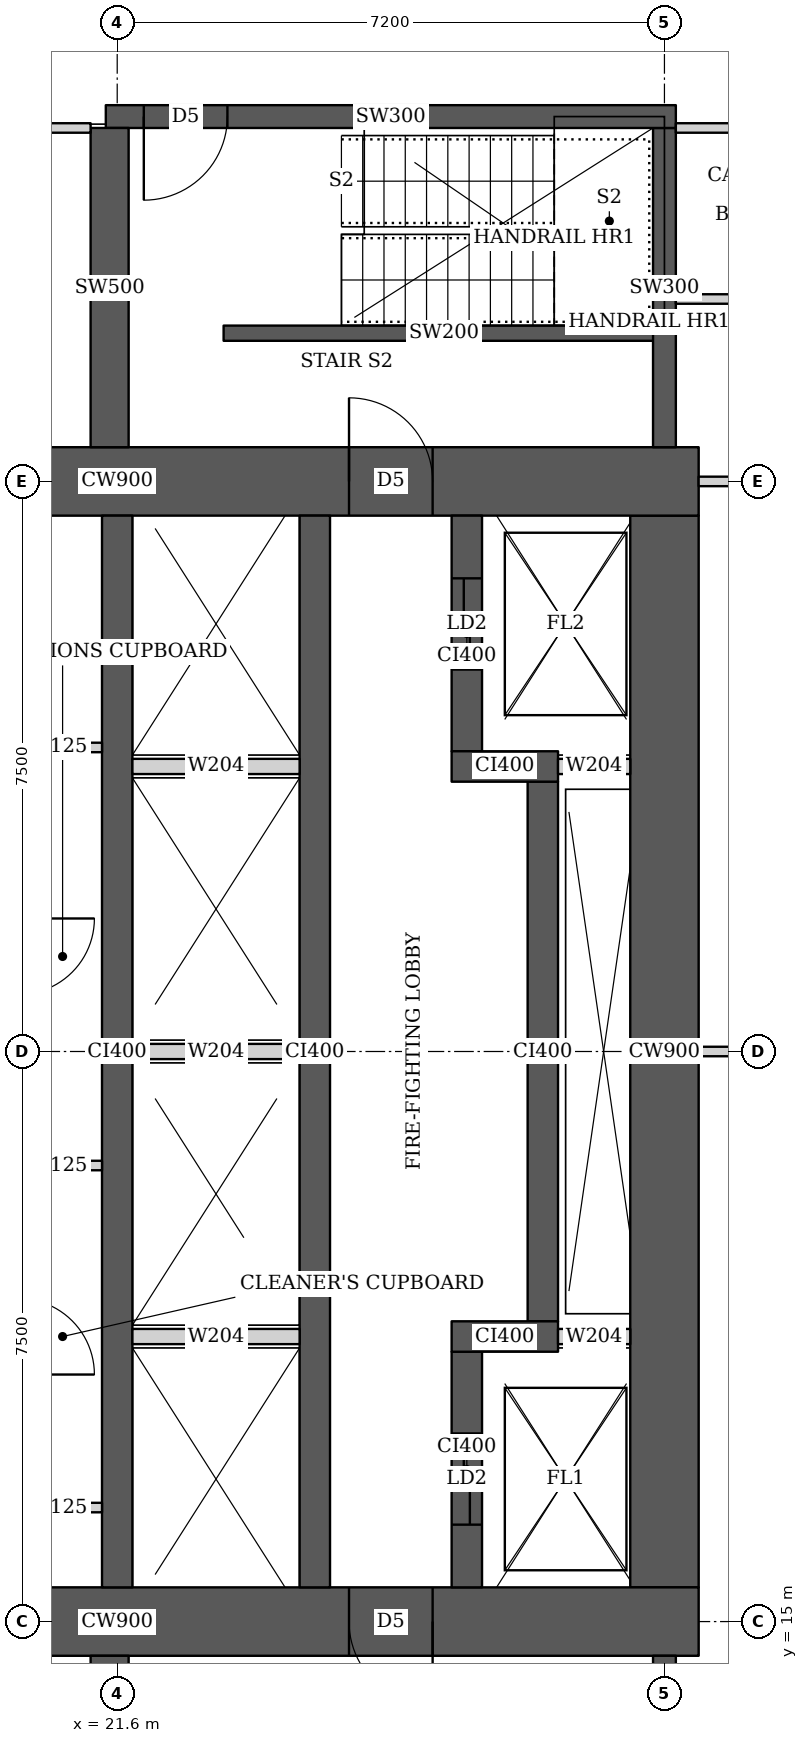
"""IFC4 building model, lengths in metres.
Left out: names, types, materials, properties, quantities, classifications, styles, units other than length and angle.
Written with IfcOpenShell. Run it as: python <this file> out.ifc"""

import sys

from ifc_helpers import new_model, si_unit, direction, frame, frame_2d, origin, place, context, subcontext, project, spatial, rectangle, extrude, element, fill, save


model = new_model("IFC4")
c1 = context("Model", 3, precision=1e-05, world=origin(), true_north=direction((0.0, 1.0)))
c2 = subcontext(c1, "Body", "Model", "MODEL_VIEW")
j1 = project(units=[si_unit("LENGTHUNIT", "METRE"), si_unit("PLANEANGLEUNIT", "RADIAN")], contexts=[c1])
p1 = place(None, origin())
s1 = spatial("IfcSite", under=j1, at=p1, CompositionType="ELEMENT")
p2 = place(p1, origin())
s2 = spatial("IfcBuilding", under=s1, at=p2, CompositionType="ELEMENT")
p3 = place(p2, frame((0.0, 0.0, 68.75)))
s3 = spatial("IfcBuildingStorey", under=s2, at=p3, CompositionType="ELEMENT", Elevation=68.75)
p4 = place(p3, frame((13.95, 15.0, 0.0), z_axis=(0.0, 0.0, 1.0), x_axis=(1.0, 0.0, 0.0)))
e1 = element("IfcWall", 1, at=p4, inside=s3, PredefinedType="SHEAR", context=c2, shape_type="SweptSolid", body=[
    extrude(rectangle(XDim=15.3, YDim=0.9, at=frame_2d((7.65, 0.0))), origin(), (0.0, 0.0, 1.0), 3.75),
])
p5 = place(p4, frame((4.45, 0.0, 0.0)))
e2 = element("IfcOpeningElement", 2, at=p5, cuts=e1, PredefinedType="OPENING", context=c2, shape_type="SweptSolid", body=[
    extrude(rectangle(XDim=1.8, YDim=2.1, at=frame_2d((0.9, 1.05))), frame((0.0, 0.46, 0.0), z_axis=(0.0, -1.0, 0.0), x_axis=(1.0, 0.0, 0.0)), (0.0, 0.0, 1.0), 0.92),
])
p6 = place(p4, frame((10.7, 0.0, 0.0)))
e3 = element("IfcOpeningElement", 3, at=p6, cuts=e1, PredefinedType="OPENING", context=c2, shape_type="SweptSolid", body=[
    extrude(rectangle(XDim=1.1, YDim=2.1, at=frame_2d((0.55, 1.05))), frame((0.0, 0.46, 0.0), z_axis=(0.0, -1.0, 0.0), x_axis=(1.0, 0.0, 0.0)), (0.0, 0.0, 1.0), 0.92),
])
p7 = place(p3, frame((13.95, 30.0, 0.0), z_axis=(0.0, 0.0, 1.0), x_axis=(1.0, 0.0, 0.0)))
e4 = element("IfcWall", 4, at=p7, inside=s3, PredefinedType="SHEAR", context=c2, shape_type="SweptSolid", body=[
    extrude(rectangle(XDim=15.3, YDim=0.9, at=frame_2d((7.65, 0.0))), origin(), (0.0, 0.0, 1.0), 3.75),
])
p8 = place(p7, frame((4.45, 0.0, 0.0)))
e5 = element("IfcOpeningElement", 5, at=p8, cuts=e4, PredefinedType="OPENING", context=c2, shape_type="SweptSolid", body=[
    extrude(rectangle(XDim=1.8, YDim=2.1, at=frame_2d((0.9, 1.05))), frame((0.0, 0.46, 0.0), z_axis=(0.0, -1.0, 0.0), x_axis=(1.0, 0.0, 0.0)), (0.0, 0.0, 1.0), 0.92),
])
p9 = place(p7, frame((10.7, 0.0, 0.0)))
e6 = element("IfcOpeningElement", 6, at=p9, cuts=e4, PredefinedType="OPENING", context=c2, shape_type="SweptSolid", body=[
    extrude(rectangle(XDim=1.1, YDim=2.1, at=frame_2d((0.55, 1.05))), frame((0.0, 0.46, 0.0), z_axis=(0.0, -1.0, 0.0), x_axis=(1.0, 0.0, 0.0)), (0.0, 0.0, 1.0), 0.92),
])
p10 = place(p3, frame((28.8, 15.45, 0.0), z_axis=(0.0, 0.0, 1.0), x_axis=(0.0, 1.0, 0.0)))
e7 = element("IfcWall", 7, at=p10, inside=s3, PredefinedType="SHEAR", context=c2, shape_type="SweptSolid", body=[
    extrude(rectangle(XDim=14.1, YDim=0.9, at=frame_2d((7.05, 0.0))), origin(), (0.0, 0.0, 1.0), 3.75),
])
for number, where, z_axis, x_axis in (
    (8, (21.6, 15.45, 0.0), (0.0, 0.0, 1.0), (0.0, 1.0, 0.0)),
    (9, (24.2, 15.45, 0.0), (0.0, 0.0, 1.0), (0.0, 1.0, 0.0)),
):
    element("IfcWall", number, at=place(p3, frame(where, z_axis=z_axis, x_axis=x_axis)), inside=s3, PredefinedType="SHEAR", context=c2, shape_type="SweptSolid", body=[
        extrude(rectangle(XDim=14.1, YDim=0.4, at=frame_2d((7.05, 0.0))), origin(), (0.0, 0.0, 1.0), 3.75),
    ])
p11 = place(p3, frame((26.2, 15.45, 0.0), z_axis=(0.0, 0.0, 1.0), x_axis=(0.0, 1.0, 0.0)))
e10 = element("IfcWall", 10, at=p11, inside=s3, PredefinedType="SHEAR", context=c2, shape_type="SweptSolid", body=[
    extrude(rectangle(XDim=3.1, YDim=0.4, at=frame_2d((1.55, 0.0))), origin(), (0.0, 0.0, 1.0), 3.75),
])
p12 = place(p11, frame((0.825, 0.0, 0.0)))
e11 = element("IfcOpeningElement", 11, at=p12, cuts=e10, PredefinedType="OPENING", context=c2, shape_type="SweptSolid", body=[
    extrude(rectangle(XDim=1.2, YDim=2.1, at=frame_2d((0.6, 1.05))), frame((0.0, 0.21, 0.0), z_axis=(0.0, -1.0, 0.0), x_axis=(1.0, 0.0, 0.0)), (0.0, 0.0, 1.0), 0.42),
])
p13 = place(p3, frame((26.0, 18.75, 0.0), z_axis=(0.0, 0.0, 1.0), x_axis=(1.0, 0.0, 0.0)))
e12 = element("IfcWall", 12, at=p13, inside=s3, PredefinedType="SHEAR", context=c2, shape_type="SweptSolid", body=[
    extrude(rectangle(XDim=1.4, YDim=0.4, at=frame_2d((0.7, 0.0))), origin(), (0.0, 0.0, 1.0), 3.75),
])
p14 = place(p3, frame((27.2, 18.95, 0.0), z_axis=(0.0, 0.0, 1.0), x_axis=(0.0, 1.0, 0.0)))
e13 = element("IfcWall", 13, at=p14, inside=s3, PredefinedType="SHEAR", context=c2, shape_type="SweptSolid", body=[
    extrude(rectangle(XDim=7.1, YDim=0.4, at=frame_2d((3.55, 0.0))), origin(), (0.0, 0.0, 1.0), 3.75),
])
p15 = place(p3, frame((26.0, 26.25, 0.0), z_axis=(0.0, 0.0, 1.0), x_axis=(1.0, 0.0, 0.0)))
e14 = element("IfcWall", 14, at=p15, inside=s3, PredefinedType="SHEAR", context=c2, shape_type="SweptSolid", body=[
    extrude(rectangle(XDim=1.4, YDim=0.4, at=frame_2d((0.7, 0.0))), origin(), (0.0, 0.0, 1.0), 3.75),
])
p16 = place(p3, frame((26.2, 26.45, 0.0), z_axis=(0.0, 0.0, 1.0), x_axis=(0.0, 1.0, 0.0)))
e15 = element("IfcWall", 15, at=p16, inside=s3, PredefinedType="SHEAR", context=c2, shape_type="SweptSolid", body=[
    extrude(rectangle(XDim=3.1, YDim=0.4, at=frame_2d((1.55, 0.0))), origin(), (0.0, 0.0, 1.0), 3.75),
])
p17 = place(p16, frame((1.075, 0.0, 0.0)))
e16 = element("IfcOpeningElement", 16, at=p17, cuts=e15, PredefinedType="OPENING", context=c2, shape_type="SweptSolid", body=[
    extrude(rectangle(XDim=1.2, YDim=2.1, at=frame_2d((0.6, 1.05))), frame((0.0, 0.21, 0.0), z_axis=(0.0, -1.0, 0.0), x_axis=(1.0, 0.0, 0.0)), (0.0, 0.0, 1.0), 0.42),
])
p18 = place(p3, frame((21.5, 10.35, 0.0), z_axis=(0.0, 0.0, 1.0), x_axis=(0.0, 1.0, 0.0)))
e17 = element("IfcWall", 17, at=p18, inside=s3, PredefinedType="SHEAR", context=c2, shape_type="SweptSolid", body=[
    extrude(rectangle(XDim=4.2, YDim=0.5, at=frame_2d((2.1, 0.0))), origin(), (0.0, 0.0, 1.0), 3.75),
])
p19 = place(p3, frame((28.8, 10.35, 0.0), z_axis=(0.0, 0.0, 1.0), x_axis=(0.0, 1.0, 0.0)))
e18 = element("IfcWall", 18, at=p19, inside=s3, PredefinedType="SHEAR", context=c2, shape_type="SweptSolid", body=[
    extrude(rectangle(XDim=4.2, YDim=0.3, at=frame_2d((2.1, 0.0))), origin(), (0.0, 0.0, 1.0), 3.75),
])
p20 = place(p3, frame((21.45, 34.8, 0.0), z_axis=(0.0, 0.0, 1.0), x_axis=(1.0, 0.0, 0.0)))
e19 = element("IfcWall", 19, at=p20, inside=s3, PredefinedType="SHEAR", context=c2, shape_type="SweptSolid", body=[
    extrude(rectangle(XDim=7.5, YDim=0.3, at=frame_2d((3.75, 0.0))), origin(), (0.0, 0.0, 1.0), 3.75),
])
p21 = place(p20, frame((0.5, 0.0, 0.0)))
e20 = element("IfcOpeningElement", 20, at=p21, cuts=e19, PredefinedType="OPENING", context=c2, shape_type="SweptSolid", body=[
    extrude(rectangle(XDim=1.1, YDim=2.1, at=frame_2d((0.55, 1.05))), frame((0.0, 0.16, 0.0), z_axis=(0.0, -1.0, 0.0), x_axis=(1.0, 0.0, 0.0)), (0.0, 0.0, 1.0), 0.32),
])
p22 = place(p3, frame((21.5, 30.45, 0.0), z_axis=(0.0, 0.0, 1.0), x_axis=(0.0, 1.0, 0.0)))
e21 = element("IfcWall", 21, at=p22, inside=s3, PredefinedType="SHEAR", context=c2, shape_type="SweptSolid", body=[
    extrude(rectangle(XDim=4.2, YDim=0.5, at=frame_2d((2.1, 0.0))), origin(), (0.0, 0.0, 1.0), 3.75),
])
p23 = place(p3, frame((28.8, 30.45, 0.0), z_axis=(0.0, 0.0, 1.0), x_axis=(0.0, 1.0, 0.0)))
e22 = element("IfcWall", 22, at=p23, inside=s3, PredefinedType="SHEAR", context=c2, shape_type="SweptSolid", body=[
    extrude(rectangle(XDim=4.2, YDim=0.3, at=frame_2d((2.1, 0.0))), origin(), (0.0, 0.0, 1.0), 3.75),
])
p24 = place(p3, frame((10.413, 34.65, 0.0), z_axis=(0.0, 0.0, 1.0), x_axis=(1.0, 0.0, 0.0)))
e23 = element("IfcWall", 23, at=p24, inside=s3, PredefinedType="PARTITIONING", context=c2, shape_type="SweptSolid", body=[
    extrude(rectangle(XDim=10.837, YDim=0.125, at=frame_2d((5.418, 0.0))), origin(), (0.0, 0.0, 1.0), 3.45),
])
p25 = place(p24, frame((7.487, 0.0, 0.0)))
e24 = element("IfcOpeningElement", 24, at=p25, cuts=e23, PredefinedType="OPENING", context=c2, shape_type="SweptSolid", body=[
    extrude(rectangle(XDim=1.8, YDim=2.1, at=frame_2d((0.9, 1.05))), frame((0.0, 0.073, 0.0), z_axis=(0.0, -1.0, 0.0), x_axis=(1.0, 0.0, 0.0)), (0.0, 0.0, 1.0), 0.145),
])
p26 = place(p3, frame((28.95, 34.65, 0.0), z_axis=(0.0, 0.0, 1.0), x_axis=(1.0, 0.0, 0.0)))
e25 = element("IfcWall", 25, at=p26, inside=s3, PredefinedType="PARTITIONING", context=c2, shape_type="SweptSolid", body=[
    extrude(rectangle(XDim=4.381, YDim=0.125, at=frame_2d((2.19, 0.0))), origin(), (0.0, 0.0, 1.0), 3.45),
])
for number, where, z_axis, x_axis in (
    (26, (29.25, 22.5, 0.0), (0.0, 0.0, 1.0), (1.0, 0.0, 0.0)),
    (27, (29.25, 30.0, 0.0), (0.0, 0.0, 1.0), (1.0, 0.0, 0.0)),
):
    element("IfcWall", number, at=place(p3, frame(where, z_axis=z_axis, x_axis=x_axis)), inside=s3, PredefinedType="PARTITIONING", context=c2, shape_type="SweptSolid", body=[
        extrude(rectangle(XDim=2.849, YDim=0.125, at=frame_2d((1.425, 0.0))), origin(), (0.0, 0.0, 1.0), 3.45),
    ])
p27 = place(p3, frame((28.95, 32.4, 0.0), z_axis=(0.0, 0.0, 1.0), x_axis=(1.0, 0.0, 0.0)))
e28 = element("IfcWall", 28, at=p27, inside=s3, PredefinedType="PARTITIONING", context=c2, shape_type="SweptSolid", body=[
    extrude(rectangle(XDim=4.722, YDim=0.125, at=frame_2d((2.361, 0.0))), origin(), (0.0, 0.0, 1.0), 3.45),
])
for number, where, z_axis, x_axis in (
    (29, (20.363, 16.5, 0.0), (0.0, 0.0, 1.0), (1.0, 0.0, 0.0)),
    (30, (20.363, 26.5, 0.0), (0.0, 0.0, 1.0), (1.0, 0.0, 0.0)),
    (31, (20.363, 21.0, 0.0), (0.0, 0.0, 1.0), (1.0, 0.0, 0.0)),
):
    element("IfcWall", number, at=place(p3, frame(where, z_axis=z_axis, x_axis=x_axis)), inside=s3, PredefinedType="PARTITIONING", context=c2, shape_type="SweptSolid", body=[
        extrude(rectangle(XDim=1.037, YDim=0.125, at=frame_2d((0.519, 0.0))), origin(), (0.0, 0.0, 1.0), 3.45),
    ])
p28 = place(p3, frame((23.0, 31.95, 0.0), z_axis=(0.0, 0.0, 1.0), x_axis=(1.0, 0.0, 0.0)))
e32 = element("IfcWall", 32, at=p28, inside=s3, PredefinedType="SHEAR", context=c2, shape_type="SweptSolid", body=[
    extrude(rectangle(XDim=5.8, YDim=0.2, at=frame_2d((2.9, 0.0))), origin(), (0.0, 0.0, 1.0), 3.75),
])
for number, where, z_axis, x_axis in (
    (33, (21.8, 18.75, 0.0), (0.0, 0.0, 1.0), (1.0, 0.0, 0.0)),
    (34, (21.8, 22.5, 0.0), (0.0, 0.0, 1.0), (1.0, 0.0, 0.0)),
    (35, (21.8, 26.25, 0.0), (0.0, 0.0, 1.0), (1.0, 0.0, 0.0)),
):
    element("IfcWall", number, at=place(p3, frame(where, z_axis=z_axis, x_axis=x_axis)), inside=s3, PredefinedType="SOLIDWALL", context=c2, shape_type="SweptSolid", body=[
        extrude(rectangle(XDim=2.2, YDim=0.2, at=frame_2d((1.1, 0.0))), origin(), (0.0, 0.0, 1.0), 3.45),
    ])
for number, where, z_axis, x_axis in (
    (36, (27.4, 18.75, 0.0), (0.0, 0.0, 1.0), (1.0, 0.0, 0.0)),
    (37, (27.4, 26.25, 0.0), (0.0, 0.0, 1.0), (1.0, 0.0, 0.0)),
):
    element("IfcWall", number, at=place(p3, frame(where, z_axis=z_axis, x_axis=x_axis)), inside=s3, PredefinedType="SOLIDWALL", context=c2, shape_type="SweptSolid", body=[
        extrude(rectangle(XDim=0.95, YDim=0.2, at=frame_2d((0.475, 0.0))), origin(), (0.0, 0.0, 1.0), 3.45),
    ])
p29 = place(p6, origin())
e38 = element("IfcDoor", 38, at=p29, inside=s3, OperationType="SINGLE_SWING_LEFT", PredefinedType="DOOR", context=c2, shape_type="SweptSolid", body=[
    extrude(rectangle(XDim=1.1, YDim=2.1, at=frame_2d((0.55, 1.05))), frame((0.0, 0.025, 0.0), z_axis=(0.0, -1.0, 0.0), x_axis=(1.0, 0.0, 0.0)), (0.0, 0.0, 1.0), 0.05),
])
fill(e3, e38)
p30 = place(p9, origin())
e39 = element("IfcDoor", 39, at=p30, inside=s3, OperationType="SINGLE_SWING_LEFT", PredefinedType="DOOR", context=c2, shape_type="SweptSolid", body=[
    extrude(rectangle(XDim=1.1, YDim=2.1, at=frame_2d((0.55, 1.05))), frame((0.0, 0.025, 0.0), z_axis=(0.0, -1.0, 0.0), x_axis=(1.0, 0.0, 0.0)), (0.0, 0.0, 1.0), 0.05),
])
fill(e6, e39)
p31 = place(p12, origin())
e40 = element("IfcDoor", 40, at=p31, inside=s3, OperationType="DOUBLE_DOOR_SLIDING", PredefinedType="DOOR", context=c2, shape_type="SweptSolid", body=[
    extrude(rectangle(XDim=1.2, YDim=2.1, at=frame_2d((0.6, 1.05))), frame((0.0, 0.025, 0.0), z_axis=(0.0, -1.0, 0.0), x_axis=(1.0, 0.0, 0.0)), (0.0, 0.0, 1.0), 0.05),
])
fill(e11, e40)
p32 = place(p17, origin())
e41 = element("IfcDoor", 41, at=p32, inside=s3, OperationType="DOUBLE_DOOR_SLIDING", PredefinedType="DOOR", context=c2, shape_type="SweptSolid", body=[
    extrude(rectangle(XDim=1.2, YDim=2.1, at=frame_2d((0.6, 1.05))), frame((0.0, 0.025, 0.0), z_axis=(0.0, -1.0, 0.0), x_axis=(1.0, 0.0, 0.0)), (0.0, 0.0, 1.0), 0.05),
])
fill(e16, e41)
p33 = place(p21, origin())
e42 = element("IfcDoor", 42, at=p33, inside=s3, OperationType="SINGLE_SWING_RIGHT", PredefinedType="DOOR", context=c2, shape_type="SweptSolid", body=[
    extrude(rectangle(XDim=1.1, YDim=2.1, at=frame_2d((0.55, 1.05))), frame((0.0, 0.025, 0.0), z_axis=(0.0, -1.0, 0.0), x_axis=(1.0, 0.0, 0.0)), (0.0, 0.0, 1.0), 0.05),
])
fill(e20, e42)
save(model, sys.argv[1])
